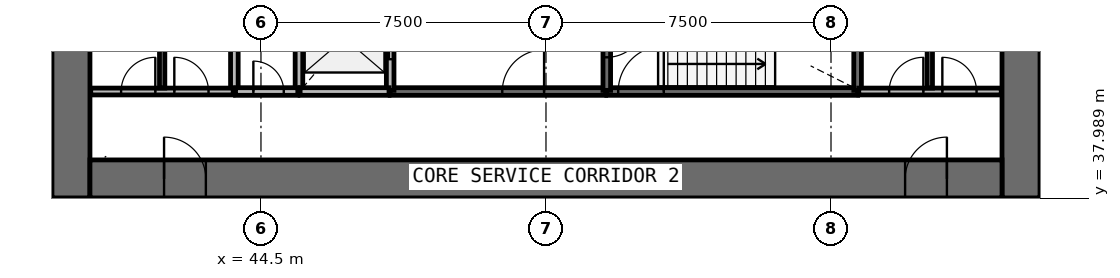
"""IFC4 building model, lengths in metres.
Left out: names, types, materials, properties, quantities, classifications, styles, units other than length and angle.
Written with IfcOpenShell. Run it as: python <this file> out.ifc"""

import sys

from ifc_helpers import new_model, si_unit, direction, frame, frame_2d, origin, place, context, subcontext, project, spatial, rectangle, extrude, source, transform, mapped, element, fill, save


model = new_model("IFC4")
c1 = context("Model", 3, precision=1e-05, world=origin(), true_north=direction((0.0, 1.0)))
c2 = subcontext(c1, "Body", "Model", "MODEL_VIEW")
j1 = project(units=[si_unit("LENGTHUNIT", "METRE"), si_unit("PLANEANGLEUNIT", "RADIAN")], contexts=[c1])
p1 = place(None, origin())
s1 = spatial("IfcSite", under=j1, at=p1, CompositionType="ELEMENT")
p2 = place(p1, origin())
s2 = spatial("IfcBuilding", under=s1, at=p2, CompositionType="ELEMENT")
p3 = place(p2, frame((0.0, 0.0, 9.4)))
s3 = spatial("IfcBuildingStorey", under=s2, at=p3, CompositionType="ELEMENT", Elevation=9.4)
p4 = place(p3, frame((64.5, 38.0, 0.0), z_axis=(0.0, 0.0, 1.0), x_axis=(0.0, 1.0, 0.0)))
e1 = element("IfcWall", 1, at=p4, inside=s3, PredefinedType="SHEAR", context=c2, shape_type="SweptSolid", body=[
    extrude(rectangle(XDim=20.0, YDim=1.0, at=frame_2d((10.0, 0.0))), origin(), (0.0, 0.0, 1.0), 4.4),
])
p5 = place(p4, frame((9.1, 0.0, 0.0)))
e2 = element("IfcOpeningElement", 2, at=p5, cuts=e1, PredefinedType="OPENING", context=c2, shape_type="SweptSolid", body=[
    extrude(rectangle(XDim=1.8, YDim=2.1, at=frame_2d((0.9, 1.05))), frame((0.0, 0.51, 0.0), z_axis=(0.0, -1.0, 0.0), x_axis=(1.0, 0.0, 0.0)), (0.0, 0.0, 1.0), 1.02),
])
p6 = place(p3, frame((39.5, 58.0, 0.0), z_axis=(0.0, 0.0, 1.0), x_axis=(0.0, -1.0, 0.0)))
e3 = element("IfcWall", 3, at=p6, inside=s3, PredefinedType="SHEAR", context=c2, shape_type="SweptSolid", body=[
    extrude(rectangle(XDim=20.0, YDim=1.0, at=frame_2d((10.0, 0.0))), origin(), (0.0, 0.0, 1.0), 4.4),
])
p7 = place(p6, frame((9.1, 0.0, 0.0)))
e4 = element("IfcOpeningElement", 4, at=p7, cuts=e3, PredefinedType="OPENING", context=c2, shape_type="SweptSolid", body=[
    extrude(rectangle(XDim=1.8, YDim=2.1, at=frame_2d((0.9, 1.05))), frame((0.0, 0.51, 0.0), z_axis=(0.0, -1.0, 0.0), x_axis=(1.0, 0.0, 0.0)), (0.0, 0.0, 1.0), 1.02),
])
p8 = place(p3, frame((40.0, 38.5, 0.0), z_axis=(0.0, 0.0, 1.0), x_axis=(1.0, 0.0, 0.0)))
e5 = element("IfcWall", 5, at=p8, inside=s3, PredefinedType="SHEAR", context=c2, shape_type="SweptSolid", body=[
    extrude(rectangle(XDim=24.0, YDim=1.0, at=frame_2d((12.0, 0.0))), origin(), (0.0, 0.0, 1.0), 4.4),
])
p9 = place(p8, frame((21.45, 0.0, 0.0)))
e6 = element("IfcOpeningElement", 6, at=p9, cuts=e5, PredefinedType="OPENING", context=c2, shape_type="SweptSolid", body=[
    extrude(rectangle(XDim=1.1, YDim=2.1, at=frame_2d((0.55, 1.05))), frame((0.0, 0.51, 0.0), z_axis=(0.0, -1.0, 0.0), x_axis=(1.0, 0.0, 0.0)), (0.0, 0.0, 1.0), 1.02),
])
p10 = place(p8, frame((1.95, 0.0, 0.0)))
e7 = element("IfcOpeningElement", 7, at=p10, cuts=e5, PredefinedType="OPENING", context=c2, shape_type="SweptSolid", body=[
    extrude(rectangle(XDim=1.1, YDim=2.1, at=frame_2d((0.55, 1.05))), frame((0.0, 0.51, 0.0), z_axis=(0.0, -1.0, 0.0), x_axis=(1.0, 0.0, 0.0)), (0.0, 0.0, 1.0), 1.02),
])
p11 = place(p3, frame((53.6, 40.8, 0.0), z_axis=(0.0, 0.0, 1.0), x_axis=(1.0, 0.0, 0.0)))
e8 = element("IfcWall", 8, at=p11, inside=s3, PredefinedType="SOLIDWALL", context=c2, shape_type="SweptSolid", body=[
    extrude(rectangle(XDim=6.6, YDim=0.2, at=frame_2d((3.3, 0.0))), origin(), (0.0, 0.0, 1.0), 3.95),
])
p12 = place(p11, frame((0.3, 0.0, 0.0)))
e9 = element("IfcOpeningElement", 9, at=p12, cuts=e8, PredefinedType="OPENING", context=c2, shape_type="SweptSolid", body=[
    extrude(rectangle(XDim=1.2, YDim=2.1, at=frame_2d((0.6, 1.05))), frame((0.0, 0.11, 0.0), z_axis=(0.0, -1.0, 0.0), x_axis=(1.0, 0.0, 0.0)), (0.0, 0.0, 1.0), 0.22),
])
p13 = place(p3, frame((47.9, 40.8, 0.0), z_axis=(0.0, 0.0, 1.0), x_axis=(1.0, 0.0, 0.0)))
e10 = element("IfcWall", 10, at=p13, inside=s3, PredefinedType="SOLIDWALL", context=c2, shape_type="SweptSolid", body=[
    extrude(rectangle(XDim=5.67, YDim=0.2, at=frame_2d((2.835, 0.0))), origin(), (0.0, 0.0, 1.0), 3.95),
])
p14 = place(p13, frame((2.95, 0.0, 0.0)))
e11 = element("IfcOpeningElement", 11, at=p14, cuts=e10, PredefinedType="OPENING", context=c2, shape_type="SweptSolid", body=[
    extrude(rectangle(XDim=1.1, YDim=2.1, at=frame_2d((0.55, 1.05))), frame((0.0, 0.11, 0.0), z_axis=(0.0, -1.0, 0.0), x_axis=(1.0, 0.0, 0.0)), (0.0, 0.0, 1.0), 0.22),
])
for number, where, z_axis, x_axis in (
    (12, (43.8, 43.6, 0.0), (0.0, 0.0, 1.0), (0.0, -1.0, 0.0)),
    (13, (45.5, 43.6, 0.0), (0.0, 0.0, 1.0), (0.0, -1.0, 0.0)),
):
    element("IfcWall", number, at=place(p3, frame(where, z_axis=z_axis, x_axis=x_axis)), inside=s3, PredefinedType="SOLIDWALL", context=c2, shape_type="SweptSolid", body=[
        extrude(rectangle(XDim=2.8, YDim=0.2, at=frame_2d((1.4, 0.0))), origin(), (0.0, 0.0, 1.0), 3.95),
    ])
p15 = place(p3, frame((47.9, 40.83, 0.0), z_axis=(0.0, 0.0, 1.0), x_axis=(0.0, 1.0, 0.0)))
e14 = element("IfcWall", 14, at=p15, inside=s3, PredefinedType="SOLIDWALL", context=c2, shape_type="SweptSolid", body=[
    extrude(rectangle(XDim=2.77, YDim=0.2, at=frame_2d((1.385, 0.0))), origin(), (0.0, 0.0, 1.0), 3.95),
])
p16 = place(p15, frame((0.82, 0.0, 0.0)))
e15 = element("IfcOpeningElement", 15, at=p16, cuts=e14, PredefinedType="OPENING", context=c2, shape_type="SweptSolid", body=[
    extrude(rectangle(XDim=1.1, YDim=2.1, at=frame_2d((0.55, 1.05))), frame((0.0, 0.11, 0.0), z_axis=(0.0, -1.0, 0.0), x_axis=(1.0, 0.0, 0.0)), (0.0, 0.0, 1.0), 0.22),
])
p17 = place(p3, frame((60.2, 40.83, 0.0), z_axis=(0.0, 0.0, 1.0), x_axis=(0.0, 1.0, 0.0)))
e16 = element("IfcWall", 16, at=p17, inside=s3, PredefinedType="SOLIDWALL", context=c2, shape_type="SweptSolid", body=[
    extrude(rectangle(XDim=2.77, YDim=0.2, at=frame_2d((1.385, 0.0))), origin(), (0.0, 0.0, 1.0), 3.95),
])
p18 = place(p3, frame((53.6, 43.6, 0.0), z_axis=(0.0, 0.0, 1.0), x_axis=(0.0, -1.0, 0.0)))
e17 = element("IfcWall", 17, at=p18, inside=s3, PredefinedType="SOLIDWALL", context=c2, shape_type="SweptSolid", body=[
    extrude(rectangle(XDim=2.77, YDim=0.2, at=frame_2d((1.385, 0.0))), origin(), (0.0, 0.0, 1.0), 3.95),
])
p19 = place(p18, frame((0.9, 0.0, 0.0)))
e18 = element("IfcOpeningElement", 18, at=p19, cuts=e17, PredefinedType="OPENING", context=c2, shape_type="SweptSolid", body=[
    extrude(rectangle(XDim=1.0, YDim=2.1, at=frame_2d((0.5, 1.05))), frame((0.0, 0.11, 0.0), z_axis=(0.0, -1.0, 0.0), x_axis=(1.0, 0.0, 0.0)), (0.0, 0.0, 1.0), 0.22),
])
p20 = place(p3, frame((45.53, 40.8, 0.0), z_axis=(0.0, 0.0, 1.0), x_axis=(1.0, 0.0, 0.0)))
e19 = element("IfcWall", 19, at=p20, inside=s3, PredefinedType="SOLIDWALL", context=c2, shape_type="SweptSolid", body=[
    extrude(rectangle(XDim=2.34, YDim=0.2, at=frame_2d((1.17, 0.0))), origin(), (0.0, 0.0, 1.0), 3.95),
])
p21 = place(p3, frame((43.83, 40.8, 0.0), z_axis=(0.0, 0.0, 1.0), x_axis=(1.0, 0.0, 0.0)))
e20 = element("IfcWall", 20, at=p21, inside=s3, PredefinedType="SOLIDWALL", context=c2, shape_type="SweptSolid", body=[
    extrude(rectangle(XDim=1.64, YDim=0.2, at=frame_2d((0.82, 0.0))), origin(), (0.0, 0.0, 1.0), 3.95),
])
p22 = place(p21, frame((0.47, 0.0, 0.0)))
e21 = element("IfcOpeningElement", 21, at=p22, cuts=e20, PredefinedType="OPENING", context=c2, shape_type="SweptSolid", body=[
    extrude(rectangle(XDim=0.8, YDim=2.1, at=frame_2d((0.4, 1.05))), frame((0.0, 0.11, 0.0), z_axis=(0.0, -1.0, 0.0), x_axis=(1.0, 0.0, 0.0)), (0.0, 0.0, 1.0), 0.22),
])
p23 = place(p3, frame((40.02, 40.8, 0.0), z_axis=(0.0, 0.0, 1.0), x_axis=(1.0, 0.0, 0.0)))
e22 = element("IfcWall", 22, at=p23, inside=s3, PredefinedType="PARTITIONING", context=c2, shape_type="SweptSolid", body=[
    extrude(rectangle(XDim=3.75, YDim=0.18, at=frame_2d((1.875, 0.0))), origin(), (0.0, 0.0, 1.0), 3.95),
])
p24 = place(p23, frame((0.8, 0.0, 0.0)))
e23 = element("IfcOpeningElement", 23, at=p24, cuts=e22, PredefinedType="OPENING", context=c2, shape_type="SweptSolid", body=[
    extrude(rectangle(XDim=0.9, YDim=2.1, at=frame_2d((0.45, 1.05))), frame((0.0, 0.1, 0.0), z_axis=(0.0, -1.0, 0.0), x_axis=(1.0, 0.0, 0.0)), (0.0, 0.0, 1.0), 0.2),
])
p25 = place(p23, frame((2.2, 0.0, 0.0)))
e24 = element("IfcOpeningElement", 24, at=p25, cuts=e22, PredefinedType="OPENING", context=c2, shape_type="SweptSolid", body=[
    extrude(rectangle(XDim=0.9, YDim=2.1, at=frame_2d((0.45, 1.05))), frame((0.0, 0.1, 0.0), z_axis=(0.0, -1.0, 0.0), x_axis=(1.0, 0.0, 0.0)), (0.0, 0.0, 1.0), 0.2),
])
p26 = place(p3, frame((60.23, 40.8, 0.0), z_axis=(0.0, 0.0, 1.0), x_axis=(1.0, 0.0, 0.0)))
e25 = element("IfcWall", 25, at=p26, inside=s3, PredefinedType="PARTITIONING", context=c2, shape_type="SweptSolid", body=[
    extrude(rectangle(XDim=3.75, YDim=0.18, at=frame_2d((1.875, 0.0))), origin(), (0.0, 0.0, 1.0), 3.95),
])
p27 = place(p26, frame((0.8, 0.0, 0.0)))
e26 = element("IfcOpeningElement", 26, at=p27, cuts=e25, PredefinedType="OPENING", context=c2, shape_type="SweptSolid", body=[
    extrude(rectangle(XDim=0.9, YDim=2.1, at=frame_2d((0.45, 1.05))), frame((0.0, 0.1, 0.0), z_axis=(0.0, -1.0, 0.0), x_axis=(1.0, 0.0, 0.0)), (0.0, 0.0, 1.0), 0.2),
])
p28 = place(p26, frame((2.2, 0.0, 0.0)))
e27 = element("IfcOpeningElement", 27, at=p28, cuts=e25, PredefinedType="OPENING", context=c2, shape_type="SweptSolid", body=[
    extrude(rectangle(XDim=0.9, YDim=2.1, at=frame_2d((0.45, 1.05))), frame((0.0, 0.1, 0.0), z_axis=(0.0, -1.0, 0.0), x_axis=(1.0, 0.0, 0.0)), (0.0, 0.0, 1.0), 0.2),
])
for number, where, z_axis, x_axis in (
    (28, (41.9, 40.89, 0.0), (0.0, 0.0, 1.0), (0.0, 1.0, 0.0)),
    (29, (62.1, 40.89, 0.0), (0.0, 0.0, 1.0), (0.0, 1.0, 0.0)),
):
    element("IfcWall", number, at=place(p3, frame(where, z_axis=z_axis, x_axis=x_axis)), inside=s3, PredefinedType="PARTITIONING", context=c2, shape_type="SweptSolid", body=[
        extrude(rectangle(XDim=2.71, YDim=0.14, at=frame_2d((1.355, 0.0))), origin(), (0.0, 0.0, 1.0), 3.15),
    ])
m1 = source(origin(), c2, "Body", "SweptSolid", [
    extrude(rectangle(XDim=1.1, YDim=2.1, at=frame_2d((0.55, 1.05))), frame((0.0, 0.025, 0.0), z_axis=(0.0, -1.0, 0.0), x_axis=(1.0, 0.0, 0.0)), (0.0, 0.0, 1.0), 0.05),
])
p29 = place(p16, origin())
e30 = element("IfcDoor", 30, at=p29, inside=s3, OperationType="DOUBLE_DOOR_SLIDING", PredefinedType="USERDEFINED", context=c2, shape_type="MappedRepresentation", body=[
    mapped(m1, transform((0.0, 0.0, 0.0), scale=1.0)),
])
fill(e15, e30)
m2 = source(origin(), c2, "Body", "SweptSolid", [
    extrude(rectangle(XDim=1.2, YDim=2.1, at=frame_2d((0.6, 1.05))), frame((0.0, 0.025, 0.0), z_axis=(0.0, -1.0, 0.0), x_axis=(1.0, 0.0, 0.0)), (0.0, 0.0, 1.0), 0.05),
])
p30 = place(p12, origin())
e31 = element("IfcDoor", 31, at=p30, inside=s3, OperationType="SINGLE_SWING_RIGHT", PredefinedType="DOOR", context=c2, shape_type="MappedRepresentation", body=[
    mapped(m2, transform((0.0, 0.0, 0.0), scale=1.0)),
])
fill(e9, e31)
m3 = source(origin(), c2, "Body", "SweptSolid", [
    extrude(rectangle(XDim=1.0, YDim=2.1, at=frame_2d((0.5, 1.05))), frame((0.0, 0.025, 0.0), z_axis=(0.0, -1.0, 0.0), x_axis=(1.0, 0.0, 0.0)), (0.0, 0.0, 1.0), 0.05),
])
p31 = place(p19, origin())
e32 = element("IfcDoor", 32, at=p31, inside=s3, OperationType="SINGLE_SWING_LEFT", PredefinedType="DOOR", context=c2, shape_type="MappedRepresentation", body=[
    mapped(m3, transform((0.0, 0.0, 0.0), scale=1.0)),
])
fill(e18, e32)
m4 = source(origin(), c2, "Body", "SweptSolid", [
    extrude(rectangle(XDim=1.1, YDim=2.1, at=frame_2d((0.55, 1.05))), frame((0.0, 0.025, 0.0), z_axis=(0.0, -1.0, 0.0), x_axis=(1.0, 0.0, 0.0)), (0.0, 0.0, 1.0), 0.05),
])
p32 = place(p14, origin())
e33 = element("IfcDoor", 33, at=p32, inside=s3, OperationType="SINGLE_SWING_RIGHT", PredefinedType="DOOR", context=c2, shape_type="MappedRepresentation", body=[
    mapped(m4, transform((0.0, 0.0, 0.0), scale=1.0)),
])
fill(e11, e33)
m5 = source(origin(), c2, "Body", "SweptSolid", [
    extrude(rectangle(XDim=0.8, YDim=2.1, at=frame_2d((0.4, 1.05))), frame((0.0, 0.025, 0.0), z_axis=(0.0, -1.0, 0.0), x_axis=(1.0, 0.0, 0.0)), (0.0, 0.0, 1.0), 0.05),
])
p33 = place(p22, origin())
e34 = element("IfcDoor", 34, at=p33, inside=s3, OperationType="SINGLE_SWING_LEFT", PredefinedType="DOOR", context=c2, shape_type="MappedRepresentation", body=[
    mapped(m5, transform((0.0, 0.0, 0.0), scale=1.0)),
])
fill(e21, e34)
m6 = source(origin(), c2, "Body", "SweptSolid", [
    extrude(rectangle(XDim=1.1, YDim=2.1, at=frame_2d((0.55, 1.05))), frame((0.0, 0.025, 0.0), z_axis=(0.0, -1.0, 0.0), x_axis=(1.0, 0.0, 0.0)), (0.0, 0.0, 1.0), 0.05),
])
p34 = place(p9, origin())
e35 = element("IfcDoor", 35, at=p34, inside=s3, OperationType="SINGLE_SWING_RIGHT", PredefinedType="DOOR", context=c2, shape_type="MappedRepresentation", body=[
    mapped(m6, transform((0.0, 0.0, 0.0), scale=1.0)),
])
fill(e6, e35)
p35 = place(p10, origin())
e36 = element("IfcDoor", 36, at=p35, inside=s3, OperationType="SINGLE_SWING_LEFT", PredefinedType="DOOR", context=c2, shape_type="MappedRepresentation", body=[
    mapped(m6, transform((0.0, 0.0, 0.0), scale=1.0)),
])
fill(e7, e36)
m7 = source(origin(), c2, "Body", "SweptSolid", [
    extrude(rectangle(XDim=0.9, YDim=2.1, at=frame_2d((0.45, 1.05))), frame((0.0, 0.025, 0.0), z_axis=(0.0, -1.0, 0.0), x_axis=(1.0, 0.0, 0.0)), (0.0, 0.0, 1.0), 0.05),
])
p36 = place(p24, origin())
e37 = element("IfcDoor", 37, at=p36, inside=s3, OperationType="SINGLE_SWING_RIGHT", PredefinedType="DOOR", context=c2, shape_type="MappedRepresentation", body=[
    mapped(m7, transform((0.0, 0.0, 0.0), scale=1.0)),
])
fill(e23, e37)
p37 = place(p25, origin())
e38 = element("IfcDoor", 38, at=p37, inside=s3, OperationType="SINGLE_SWING_LEFT", PredefinedType="DOOR", context=c2, shape_type="MappedRepresentation", body=[
    mapped(m7, transform((0.0, 0.0, 0.0), scale=1.0)),
])
fill(e24, e38)
p38 = place(p27, origin())
e39 = element("IfcDoor", 39, at=p38, inside=s3, OperationType="SINGLE_SWING_RIGHT", PredefinedType="DOOR", context=c2, shape_type="MappedRepresentation", body=[
    mapped(m7, transform((0.0, 0.0, 0.0), scale=1.0)),
])
fill(e26, e39)
p39 = place(p28, origin())
e40 = element("IfcDoor", 40, at=p39, inside=s3, OperationType="SINGLE_SWING_LEFT", PredefinedType="DOOR", context=c2, shape_type="MappedRepresentation", body=[
    mapped(m7, transform((0.0, 0.0, 0.0), scale=1.0)),
])
fill(e27, e40)
save(model, sys.argv[1])
